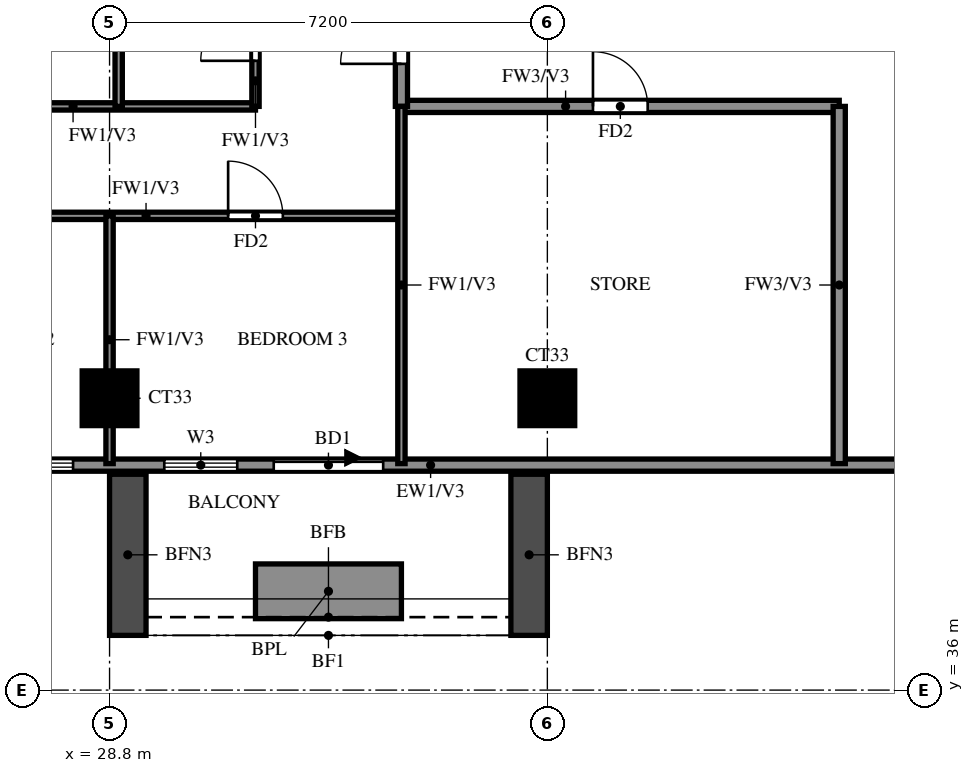
"""IFC4 building model, lengths in metres.
Left out: names, types, materials, properties, quantities, classifications, styles, units other than length and angle.
Written with IfcOpenShell. Run it as: python <this file> out.ifc"""

import sys

from ifc_helpers import new_model, si_unit, direction, frame, frame_2d, origin, origin_2d, place, context, subcontext, project, spatial, rectangle, extrude, source, transform, mapped, element, fill, save


model = new_model("IFC4")
c1 = context("Model", 3, precision=1e-05, world=origin(), true_north=direction((0.0, 1.0)))
c2 = subcontext(c1, "Body", "Model", "MODEL_VIEW")
j1 = project(units=[si_unit("LENGTHUNIT", "METRE"), si_unit("PLANEANGLEUNIT", "RADIAN")], contexts=[c1])
p1 = place(None, origin())
s1 = spatial("IfcSite", under=j1, at=p1, CompositionType="ELEMENT")
p2 = place(p1, origin())
s2 = spatial("IfcBuilding", under=s1, at=p2, CompositionType="ELEMENT")
p3 = place(p2, frame((0.0, 0.0, 222.0)))
s3 = spatial("IfcBuildingStorey", under=s2, at=p3, CompositionType="ELEMENT", Elevation=222.0)
m1 = source(origin(), c2, "Body", "SweptSolid", [
    extrude(rectangle(XDim=0.9, YDim=0.9, at=origin_2d()), origin(), (0.0, 0.0, 1.0), 3.22),
])
for number, where, z_axis, x_axis in (
    (1, (28.8, 40.8, 0.0), (0.0, 0.0, 1.0), (1.0, 0.0, 0.0)),
    (2, (36.0, 40.8, 0.0), (0.0, 0.0, 1.0), (1.0, 0.0, 0.0)),
):
    element("IfcColumn", number, at=place(p3, frame(where, z_axis=z_axis, x_axis=x_axis)), inside=s3, PredefinedType="COLUMN", context=c2, shape_type="MappedRepresentation", body=[
        mapped(m1, transform((0.0, 0.0, 0.0))),
    ])
p4 = place(p3, frame((22.2, 39.7, 0.0), z_axis=(0.0, 0.0, 1.0), x_axis=(1.0, 0.0, 0.0)))
e3 = element("IfcWall", 3, at=p4, inside=s3, PredefinedType="SOLIDWALL", context=c2, shape_type="SweptSolid", body=[
    extrude(rectangle(XDim=19.8, YDim=0.2, at=frame_2d((9.9, 0.0))), origin(), (0.0, 0.0, 1.0), 3.22),
])
p5 = place(p4, frame((9.3, 0.0, 0.0)))
e4 = element("IfcOpeningElement", 4, at=p5, cuts=e3, PredefinedType="OPENING", context=c2, shape_type="SweptSolid", body=[
    extrude(rectangle(XDim=1.8, YDim=2.4, at=frame_2d((0.9, 1.2))), frame((0.0, 0.11, 0.0), z_axis=(0.0, -1.0, 0.0), x_axis=(1.0, 0.0, 0.0)), (0.0, 0.0, 1.0), 0.22),
])
p6 = place(p4, frame((0.7, 0.0, 0.6)))
e5 = element("IfcOpeningElement", 5, at=p6, cuts=e3, PredefinedType="OPENING", context=c2, shape_type="SweptSolid", body=[
    extrude(rectangle(XDim=1.8, YDim=2.4, at=frame_2d((0.9, 1.2))), frame((0.0, 0.11, 0.0), z_axis=(0.0, -1.0, 0.0), x_axis=(1.0, 0.0, 0.0)), (0.0, 0.0, 1.0), 0.22),
])
p7 = place(p4, frame((3.6, 0.0, 0.6)))
e6 = element("IfcOpeningElement", 6, at=p7, cuts=e3, PredefinedType="OPENING", context=c2, shape_type="SweptSolid", body=[
    extrude(rectangle(XDim=2.4, YDim=2.4, at=frame_2d((1.2, 1.2))), frame((0.0, 0.11, 0.0), z_axis=(0.0, -1.0, 0.0), x_axis=(1.0, 0.0, 0.0)), (0.0, 0.0, 1.0), 0.22),
])
p8 = place(p4, frame((7.5, 0.0, 0.6)))
e7 = element("IfcOpeningElement", 7, at=p8, cuts=e3, PredefinedType="OPENING", context=c2, shape_type="SweptSolid", body=[
    extrude(rectangle(XDim=1.2, YDim=2.4, at=frame_2d((0.6, 1.2))), frame((0.0, 0.11, 0.0), z_axis=(0.0, -1.0, 0.0), x_axis=(1.0, 0.0, 0.0)), (0.0, 0.0, 1.0), 0.22),
])
for number, where, z_axis, x_axis in (
    (8, (29.1, 39.55, 0.0), (0.0, 0.0, 1.0), (0.0, -1.0, 0.0)),
    (9, (35.7, 39.55, 0.0), (0.0, 0.0, 1.0), (0.0, -1.0, 0.0)),
):
    element("IfcWall", number, at=place(p3, frame(where, z_axis=z_axis, x_axis=x_axis)), inside=s3, PredefinedType="SOLIDWALL", context=c2, shape_type="SweptSolid", body=[
        extrude(rectangle(XDim=2.65, YDim=0.6, at=frame_2d((1.325, 0.0))), origin(), (0.0, 0.0, 1.0), 2.85),
    ])
p9 = place(p3, frame((31.2, 37.625, 0.0), z_axis=(0.0, 0.0, 1.0), x_axis=(1.0, 0.0, 0.0)))
e10 = element("IfcWall", 10, at=p9, inside=s3, PredefinedType="SOLIDWALL", context=c2, shape_type="SweptSolid", body=[
    extrude(rectangle(XDim=2.4, YDim=0.9, at=frame_2d((1.2, 0.0))), origin(), (0.0, 0.0, 1.0), 0.9),
])
p10 = place(p3, frame((33.6, 45.6, 0.0), z_axis=(0.0, 0.0, 1.0), x_axis=(1.0, 0.0, 0.0)))
e11 = element("IfcWall", 11, at=p10, inside=s3, PredefinedType="SOLIDWALL", context=c2, shape_type="SweptSolid", body=[
    extrude(rectangle(XDim=7.2, YDim=0.2, at=frame_2d((3.6, 0.0))), origin(), (0.0, 0.0, 1.0), 3.22),
])
p11 = place(p10, frame((3.15, 0.0, 0.0)))
e12 = element("IfcOpeningElement", 12, at=p11, cuts=e11, PredefinedType="OPENING", context=c2, shape_type="SweptSolid", body=[
    extrude(rectangle(XDim=0.9, YDim=2.1, at=frame_2d((0.45, 1.05))), frame((0.0, 0.11, 0.0), z_axis=(0.0, -1.0, 0.0), x_axis=(1.0, 0.0, 0.0)), (0.0, 0.0, 1.0), 0.22),
])
p12 = place(p3, frame((33.6, 45.6, 0.0), z_axis=(0.0, 0.0, 1.0), x_axis=(0.0, 1.0, 0.0)))
e13 = element("IfcWall", 13, at=p12, inside=s3, PredefinedType="SOLIDWALL", context=c2, shape_type="SweptSolid", body=[
    extrude(rectangle(XDim=12.0, YDim=0.2, at=frame_2d((6.0, 0.0))), origin(), (0.0, 0.0, 1.0), 3.22),
])
p13 = place(p12, frame((0.7, 0.0, 0.0)))
e14 = element("IfcOpeningElement", 14, at=p13, cuts=e13, PredefinedType="OPENING", context=c2, shape_type="SweptSolid", body=[
    extrude(rectangle(XDim=1.0, YDim=2.1, at=frame_2d((0.5, 1.05))), frame((0.0, 0.11, 0.0), z_axis=(0.0, -1.0, 0.0), x_axis=(1.0, 0.0, 0.0)), (0.0, 0.0, 1.0), 0.22),
])
p14 = place(p12, frame((10.3, 0.0, 0.0)))
e15 = element("IfcOpeningElement", 15, at=p14, cuts=e13, PredefinedType="OPENING", context=c2, shape_type="SweptSolid", body=[
    extrude(rectangle(XDim=1.0, YDim=2.1, at=frame_2d((0.5, 1.05))), frame((0.0, 0.11, 0.0), z_axis=(0.0, -1.0, 0.0), x_axis=(1.0, 0.0, 0.0)), (0.0, 0.0, 1.0), 0.22),
])
p15 = place(p3, frame((40.8, 39.725, 0.0), z_axis=(0.0, 0.0, 1.0), x_axis=(0.0, 1.0, 0.0)))
e16 = element("IfcWall", 16, at=p15, inside=s3, PredefinedType="SOLIDWALL", context=c2, shape_type="SweptSolid", body=[
    extrude(rectangle(XDim=5.875, YDim=0.2, at=frame_2d((2.938, 0.0))), origin(), (0.0, 0.0, 1.0), 3.22),
])
p16 = place(p3, frame((25.2, 43.8, 0.0), z_axis=(0.0, 0.0, 1.0), x_axis=(1.0, 0.0, 0.0)))
e17 = element("IfcWall", 17, at=p16, inside=s3, PredefinedType="PARTITIONING", context=c2, shape_type="SweptSolid", body=[
    extrude(rectangle(XDim=8.4, YDim=0.12, at=frame_2d((4.2, 0.0))), origin(), (0.0, 0.0, 1.0), 3.22),
])
p17 = place(p16, frame((1.35, 0.0, 0.0)))
e18 = element("IfcOpeningElement", 18, at=p17, cuts=e17, PredefinedType="OPENING", context=c2, shape_type="SweptSolid", body=[
    extrude(rectangle(XDim=0.9, YDim=2.1, at=frame_2d((0.45, 1.05))), frame((0.0, 0.07, 0.0), z_axis=(0.0, -1.0, 0.0), x_axis=(1.0, 0.0, 0.0)), (0.0, 0.0, 1.0), 0.14),
])
p18 = place(p16, frame((5.55, 0.0, 0.0)))
e19 = element("IfcOpeningElement", 19, at=p18, cuts=e17, PredefinedType="OPENING", context=c2, shape_type="SweptSolid", body=[
    extrude(rectangle(XDim=0.9, YDim=2.1, at=frame_2d((0.45, 1.05))), frame((0.0, 0.07, 0.0), z_axis=(0.0, -1.0, 0.0), x_axis=(1.0, 0.0, 0.0)), (0.0, 0.0, 1.0), 0.14),
])
p19 = place(p3, frame((25.2, 45.6, 0.0), z_axis=(0.0, 0.0, 1.0), x_axis=(1.0, 0.0, 0.0)))
e20 = element("IfcWall", 20, at=p19, inside=s3, PredefinedType="PARTITIONING", context=c2, shape_type="SweptSolid", body=[
    extrude(rectangle(XDim=6.0, YDim=0.12, at=frame_2d((3.0, 0.0))), origin(), (0.0, 0.0, 1.0), 3.22),
])
p20 = place(p19, frame((1.425, 0.0, 0.0)))
e21 = element("IfcOpeningElement", 21, at=p20, cuts=e20, PredefinedType="OPENING", context=c2, shape_type="SweptSolid", body=[
    extrude(rectangle(XDim=0.9, YDim=2.1, at=frame_2d((0.45, 1.05))), frame((0.0, 0.07, 0.0), z_axis=(0.0, -1.0, 0.0), x_axis=(1.0, 0.0, 0.0)), (0.0, 0.0, 1.0), 0.14),
])
p21 = place(p3, frame((28.8, 39.725, 0.0), z_axis=(0.0, 0.0, 1.0), x_axis=(0.0, 1.0, 0.0)))
e22 = element("IfcWall", 22, at=p21, inside=s3, PredefinedType="PARTITIONING", context=c2, shape_type="SweptSolid", body=[
    extrude(rectangle(XDim=4.075, YDim=0.12, at=frame_2d((2.038, 0.0))), origin(), (0.0, 0.0, 1.0), 3.22),
])
p22 = place(p3, frame((28.95, 45.6, 0.0), z_axis=(0.0, 0.0, 1.0), x_axis=(0.0, 1.0, 0.0)))
e23 = element("IfcWall", 23, at=p22, inside=s3, PredefinedType="PARTITIONING", context=c2, shape_type="SweptSolid", body=[
    extrude(rectangle(XDim=2.4, YDim=0.12, at=frame_2d((1.2, 0.0))), origin(), (0.0, 0.0, 1.0), 3.22),
])
p23 = place(p3, frame((31.2, 45.6, 0.0), z_axis=(0.0, 0.0, 1.0), x_axis=(0.0, 1.0, 0.0)))
e24 = element("IfcWall", 24, at=p23, inside=s3, PredefinedType="PARTITIONING", context=c2, shape_type="SweptSolid", body=[
    extrude(rectangle(XDim=2.4, YDim=0.12, at=frame_2d((1.2, 0.0))), origin(), (0.0, 0.0, 1.0), 3.22),
])
p24 = place(p23, frame((0.75, 0.0, 0.0)))
e25 = element("IfcOpeningElement", 25, at=p24, cuts=e24, PredefinedType="OPENING", context=c2, shape_type="SweptSolid", body=[
    extrude(rectangle(XDim=0.9, YDim=2.1, at=frame_2d((0.45, 1.05))), frame((0.0, 0.07, 0.0), z_axis=(0.0, -1.0, 0.0), x_axis=(1.0, 0.0, 0.0)), (0.0, 0.0, 1.0), 0.14),
])
p25 = place(p3, frame((33.6, 39.725, 0.0), z_axis=(0.0, 0.0, 1.0), x_axis=(0.0, 1.0, 0.0)))
e26 = element("IfcWall", 26, at=p25, inside=s3, PredefinedType="PARTITIONING", context=c2, shape_type="SweptSolid", body=[
    extrude(rectangle(XDim=5.875, YDim=0.12, at=frame_2d((2.938, 0.0))), origin(), (0.0, 0.0, 1.0), 3.22),
])
p26 = place(p5, origin())
e27 = element("IfcDoor", 27, at=p26, inside=s3, OperationType="DOUBLE_DOOR_SLIDING", PredefinedType="DOOR", context=c2, shape_type="SweptSolid", body=[
    extrude(rectangle(XDim=1.8, YDim=2.4, at=frame_2d((0.9, 1.2))), frame((0.0, 0.025, 0.0), z_axis=(0.0, -1.0, 0.0), x_axis=(1.0, 0.0, 0.0)), (0.0, 0.0, 1.0), 0.05),
])
fill(e4, e27)
p27 = place(p7, origin())
e28 = element("IfcWindow", 28, at=p27, inside=s3, PartitioningType="DOUBLE_PANEL_VERTICAL", PredefinedType="WINDOW", context=c2, shape_type="SweptSolid", body=[
    extrude(rectangle(XDim=2.4, YDim=2.4, at=frame_2d((1.2, 1.2))), frame((0.0, 0.03, 0.0), z_axis=(0.0, -1.0, 0.0), x_axis=(1.0, 0.0, 0.0)), (0.0, 0.0, 1.0), 0.06),
])
fill(e6, e28)
p28 = place(p8, origin())
e29 = element("IfcWindow", 29, at=p28, inside=s3, PartitioningType="SINGLE_PANEL", PredefinedType="WINDOW", context=c2, shape_type="SweptSolid", body=[
    extrude(rectangle(XDim=1.2, YDim=2.4, at=frame_2d((0.6, 1.2))), frame((0.0, 0.03, 0.0), z_axis=(0.0, -1.0, 0.0), x_axis=(1.0, 0.0, 0.0)), (0.0, 0.0, 1.0), 0.06),
])
fill(e7, e29)
p29 = place(p13, origin())
e30 = element("IfcDoor", 30, at=p29, inside=s3, OperationType="SINGLE_SWING_LEFT", PredefinedType="DOOR", context=c2, shape_type="SweptSolid", body=[
    extrude(rectangle(XDim=1.0, YDim=2.1, at=frame_2d((0.5, 1.05))), frame((0.0, 0.025, 0.0), z_axis=(0.0, -1.0, 0.0), x_axis=(1.0, 0.0, 0.0)), (0.0, 0.0, 1.0), 0.05),
])
fill(e14, e30)
p30 = place(p18, origin())
e31 = element("IfcDoor", 31, at=p30, inside=s3, OperationType="SINGLE_SWING_LEFT", PredefinedType="DOOR", context=c2, shape_type="SweptSolid", body=[
    extrude(rectangle(XDim=0.9, YDim=2.1, at=frame_2d((0.45, 1.05))), frame((0.0, 0.025, 0.0), z_axis=(0.0, -1.0, 0.0), x_axis=(1.0, 0.0, 0.0)), (0.0, 0.0, 1.0), 0.05),
])
fill(e19, e31)
p31 = place(p24, origin())
e32 = element("IfcDoor", 32, at=p31, inside=s3, OperationType="SINGLE_SWING_LEFT", PredefinedType="DOOR", context=c2, shape_type="SweptSolid", body=[
    extrude(rectangle(XDim=0.9, YDim=2.1, at=frame_2d((0.45, 1.05))), frame((0.0, 0.025, 0.0), z_axis=(0.0, -1.0, 0.0), x_axis=(1.0, 0.0, 0.0)), (0.0, 0.0, 1.0), 0.05),
])
fill(e25, e32)
p32 = place(p11, origin())
e33 = element("IfcDoor", 33, at=p32, inside=s3, OperationType="SINGLE_SWING_LEFT", PredefinedType="DOOR", context=c2, shape_type="SweptSolid", body=[
    extrude(rectangle(XDim=0.9, YDim=2.1, at=frame_2d((0.45, 1.05))), frame((0.0, 0.025, 0.0), z_axis=(0.0, -1.0, 0.0), x_axis=(1.0, 0.0, 0.0)), (0.0, 0.0, 1.0), 0.05),
])
fill(e12, e33)
save(model, sys.argv[1])
